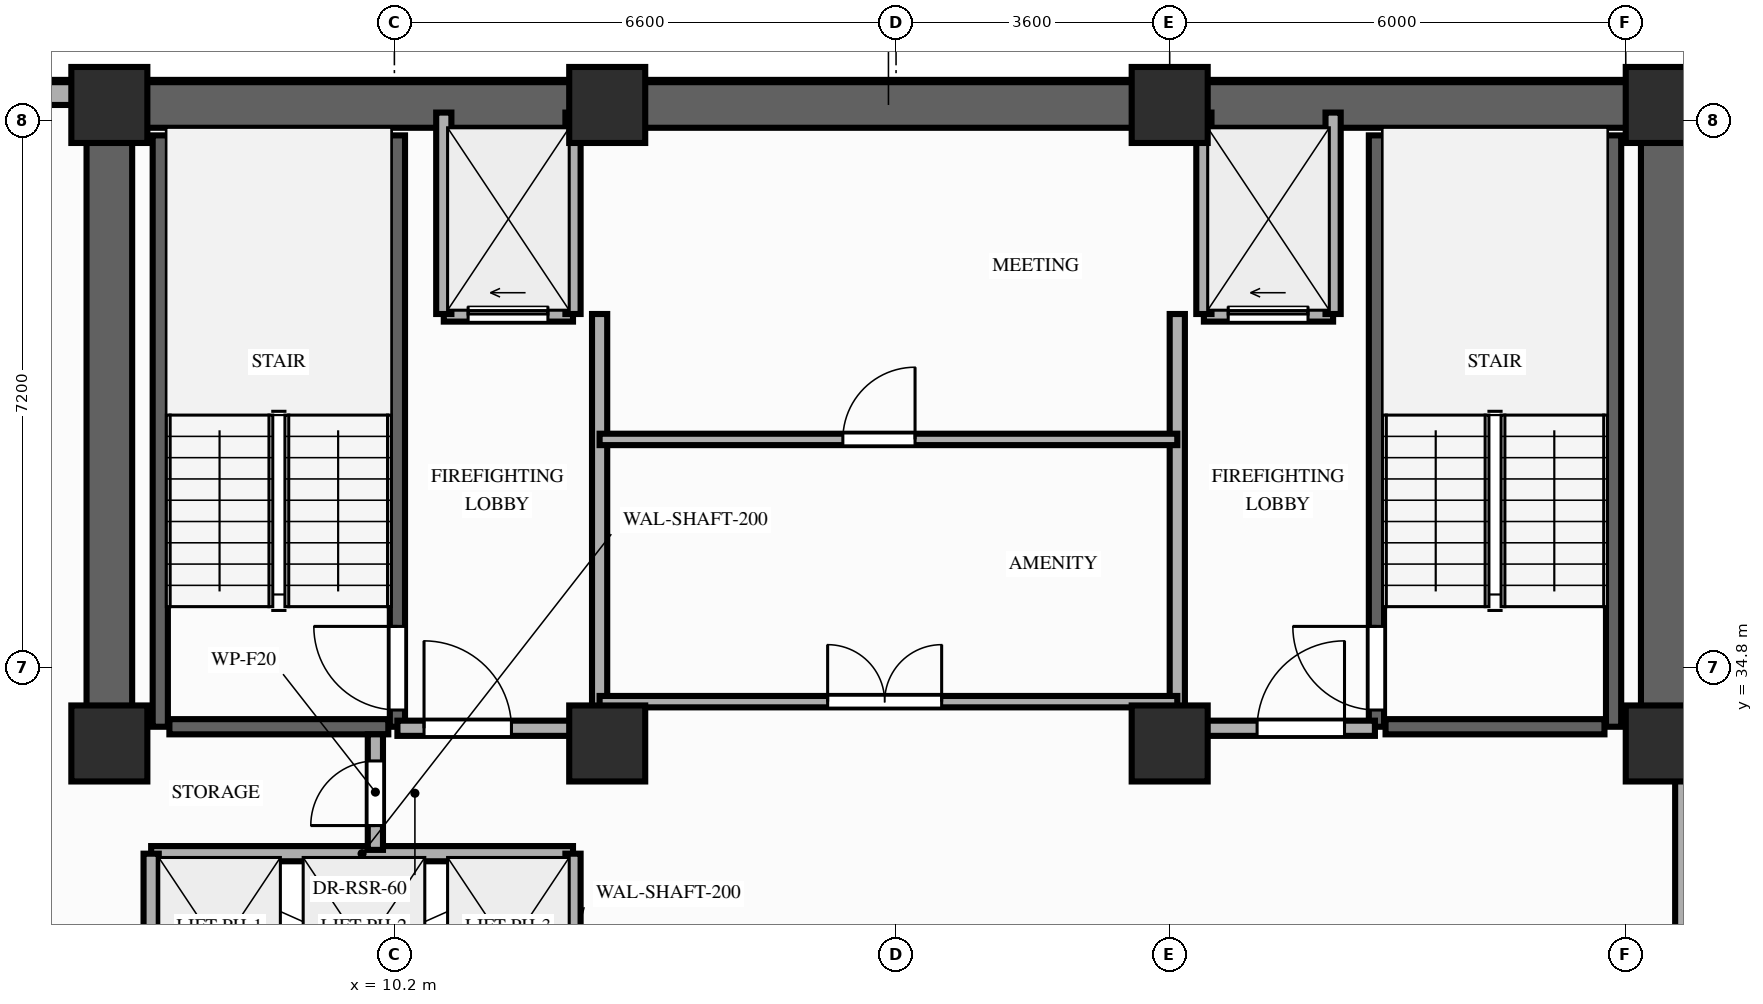
"""IFC4 building model, lengths in metres.
Left out: names, types, materials, properties, quantities, classifications, styles, units other than length and angle.
Written with IfcOpenShell. Run it as: python <this file> out.ifc"""

import sys

from ifc_helpers import new_model, si_unit, direction, frame, frame_2d, origin, origin_2d, place, context, subcontext, project, spatial, rectangle, extrude, element, fill, save


model = new_model("IFC4")
c1 = context("Model", 3, precision=1e-05, world=origin(), true_north=direction((0.0, 1.0)))
c2 = subcontext(c1, "Body", "Model", "MODEL_VIEW")
j1 = project(units=[si_unit("LENGTHUNIT", "METRE"), si_unit("PLANEANGLEUNIT", "RADIAN")], contexts=[c1])
p1 = place(None, origin())
s1 = spatial("IfcSite", under=j1, at=p1, CompositionType="ELEMENT")
p2 = place(p1, origin())
s2 = spatial("IfcBuilding", under=s1, at=p2, CompositionType="ELEMENT")
p3 = place(p2, frame((0.0, 0.0, 185.6)))
s3 = spatial("IfcBuildingStorey", under=s2, at=p3, CompositionType="ELEMENT", Elevation=185.6)
for number, where, z_axis, x_axis in (
    (1, (6.45, 33.8, 0.0), (0.0, 0.0, 1.0), (1.0, 0.0, 0.0)),
    (2, (13.0, 33.8, 0.0), (0.0, 0.0, 1.0), (1.0, 0.0, 0.0)),
    (3, (20.4, 33.8, 0.0), (0.0, 0.0, 1.0), (1.0, 0.0, 0.0)),
    (4, (26.9, 33.8, 0.0), (0.0, 0.0, 1.0), (1.0, 0.0, 0.0)),
    (5, (6.45, 42.2, 0.0), (0.0, 0.0, 1.0), (1.0, 0.0, 0.0)),
    (6, (13.0, 42.2, 0.0), (0.0, 0.0, 1.0), (1.0, 0.0, 0.0)),
    (7, (20.4, 42.2, 0.0), (0.0, 0.0, 1.0), (1.0, 0.0, 0.0)),
    (8, (26.9, 42.2, 0.0), (0.0, 0.0, 1.0), (1.0, 0.0, 0.0)),
):
    element("IfcColumn", number, at=place(p3, frame(where, z_axis=z_axis, x_axis=x_axis)), inside=s3, PredefinedType="COLUMN", context=c2, shape_type="SweptSolid", body=[
        extrude(rectangle(XDim=1.0, YDim=1.0, at=origin_2d()), origin(), (0.0, 0.0, 1.0), 3.2),
    ])
p4 = place(p3, frame((6.0, 42.35, 0.0), z_axis=(0.0, 0.0, 1.0), x_axis=(-1.0, 0.0, 0.0)))
e9 = element("IfcWall", 9, at=p4, inside=s3, PredefinedType="STANDARD", context=c2, shape_type="SweptSolid", body=[
    extrude(rectangle(XDim=2.0, YDim=0.3, at=frame_2d((1.0, 0.0))), origin(), (0.0, 0.0, 1.0), 3.02),
])
p5 = place(p3, frame((6.45, 42.2, 0.0), z_axis=(0.0, 0.0, 1.0), x_axis=(1.0, 0.0, 0.0)))
e10 = element("IfcWall", 10, at=p5, inside=s3, PredefinedType="SHEAR", context=c2, shape_type="SweptSolid", body=[
    extrude(rectangle(XDim=20.45, YDim=0.6, at=frame_2d((10.225, 0.0))), origin(), (0.0, 0.0, 1.0), 3.02),
])
for number, where, z_axis, x_axis in (
    (11, (6.45, 33.8, 0.0), (0.0, 0.0, 1.0), (0.0, 1.0, 0.0)),
    (12, (26.9, 33.8, 0.0), (0.0, 0.0, 1.0), (0.0, 1.0, 0.0)),
):
    element("IfcWall", number, at=place(p3, frame(where, z_axis=z_axis, x_axis=x_axis)), inside=s3, PredefinedType="SHEAR", context=c2, shape_type="SweptSolid", body=[
        extrude(rectangle(XDim=7.95, YDim=0.6, at=frame_2d((3.975, 0.0))), origin(), (0.0, 0.0, 1.0), 3.02),
    ])
p6 = place(p3, frame((7.12, 34.02, 0.0), z_axis=(0.0, 0.0, 1.0), x_axis=(0.0, 1.0, 0.0)))
e13 = element("IfcWall", 13, at=p6, inside=s3, PredefinedType="SHEAR", context=c2, shape_type="SweptSolid", body=[
    extrude(rectangle(XDim=7.78, YDim=0.2, at=frame_2d((3.89, 0.0))), origin(), (0.0, 0.0, 1.0), 3.02),
])
p7 = place(p3, frame((10.24, 34.02, 0.0), z_axis=(0.0, 0.0, 1.0), x_axis=(0.0, 1.0, 0.0)))
e14 = element("IfcWall", 14, at=p7, inside=s3, PredefinedType="SHEAR", context=c2, shape_type="SweptSolid", body=[
    extrude(rectangle(XDim=7.78, YDim=0.2, at=frame_2d((3.89, 0.0))), origin(), (0.0, 0.0, 1.0), 3.02),
])
p8 = place(p7, frame((0.22, 0.0, 0.0)))
e15 = element("IfcOpeningElement", 15, at=p8, cuts=e14, PredefinedType="OPENING", context=c2, shape_type="SweptSolid", body=[
    extrude(rectangle(XDim=1.1, YDim=2.15, at=frame_2d((0.55, 1.075))), frame((0.0, 0.11, 0.0), z_axis=(0.0, -1.0, 0.0), x_axis=(1.0, 0.0, 0.0)), (0.0, 0.0, 1.0), 0.22),
])
p9 = place(p3, frame((7.24, 34.02, 0.0), z_axis=(0.0, 0.0, 1.0), x_axis=(1.0, 0.0, 0.0)))
e16 = element("IfcWall", 16, at=p9, inside=s3, PredefinedType="SHEAR", context=c2, shape_type="SweptSolid", body=[
    extrude(rectangle(XDim=2.88, YDim=0.2, at=frame_2d((1.44, 0.0))), origin(), (0.0, 0.0, 1.0), 3.02),
])
p10 = place(p3, frame((23.12, 34.02, 0.0), z_axis=(0.0, 0.0, 1.0), x_axis=(0.0, 1.0, 0.0)))
e17 = element("IfcWall", 17, at=p10, inside=s3, PredefinedType="SHEAR", context=c2, shape_type="SweptSolid", body=[
    extrude(rectangle(XDim=7.78, YDim=0.2, at=frame_2d((3.89, 0.0))), origin(), (0.0, 0.0, 1.0), 3.02),
])
p11 = place(p10, frame((0.22, 0.0, 0.0)))
e18 = element("IfcOpeningElement", 18, at=p11, cuts=e17, PredefinedType="OPENING", context=c2, shape_type="SweptSolid", body=[
    extrude(rectangle(XDim=1.1, YDim=2.15, at=frame_2d((0.55, 1.075))), frame((0.0, 0.11, 0.0), z_axis=(0.0, -1.0, 0.0), x_axis=(1.0, 0.0, 0.0)), (0.0, 0.0, 1.0), 0.22),
])
p12 = place(p3, frame((26.24, 34.02, 0.0), z_axis=(0.0, 0.0, 1.0), x_axis=(0.0, 1.0, 0.0)))
e19 = element("IfcWall", 19, at=p12, inside=s3, PredefinedType="SHEAR", context=c2, shape_type="SweptSolid", body=[
    extrude(rectangle(XDim=7.78, YDim=0.2, at=frame_2d((3.89, 0.0))), origin(), (0.0, 0.0, 1.0), 3.02),
])
p13 = place(p3, frame((23.24, 34.02, 0.0), z_axis=(0.0, 0.0, 1.0), x_axis=(1.0, 0.0, 0.0)))
e20 = element("IfcWall", 20, at=p13, inside=s3, PredefinedType="SHEAR", context=c2, shape_type="SweptSolid", body=[
    extrude(rectangle(XDim=2.88, YDim=0.2, at=frame_2d((1.44, 0.0))), origin(), (0.0, 0.0, 1.0), 3.02),
])
p14 = place(p3, frame((7.0, 32.35, 0.0), z_axis=(0.0, 0.0, 1.0), x_axis=(1.0, 0.0, 0.0)))
e21 = element("IfcWall", 21, at=p14, inside=s3, PredefinedType="MOVABLE", context=c2, shape_type="SweptSolid", body=[
    extrude(rectangle(XDim=5.55, YDim=0.2, at=frame_2d((2.775, 0.0))), origin(), (0.0, 0.0, 1.0), 3.02),
])
for number, where, z_axis, x_axis in (
    (22, (7.0, 29.85, 0.0), (0.0, 0.0, 1.0), (0.0, 1.0, 0.0)),
    (23, (12.55, 29.85, 0.0), (0.0, 0.0, 1.0), (0.0, 1.0, 0.0)),
):
    element("IfcWall", number, at=place(p3, frame(where, z_axis=z_axis, x_axis=x_axis)), inside=s3, PredefinedType="MOVABLE", context=c2, shape_type="SweptSolid", body=[
        extrude(rectangle(XDim=2.5, YDim=0.2, at=frame_2d((1.25, 0.0))), origin(), (0.0, 0.0, 1.0), 3.02),
    ])
p15 = place(p3, frame((10.85, 39.45, 0.0), z_axis=(0.0, 0.0, 1.0), x_axis=(1.0, 0.0, 0.0)))
e24 = element("IfcWall", 24, at=p15, inside=s3, PredefinedType="MOVABLE", context=c2, shape_type="SweptSolid", body=[
    extrude(rectangle(XDim=1.7, YDim=0.2, at=frame_2d((0.85, 0.0))), origin(), (0.0, 0.0, 1.0), 3.02),
])
p16 = place(p15, frame((0.32, 0.0, 0.0)))
e25 = element("IfcOpeningElement", 25, at=p16, cuts=e24, PredefinedType="OPENING", context=c2, shape_type="SweptSolid", body=[
    extrude(rectangle(XDim=1.05, YDim=2.15, at=frame_2d((0.525, 1.075))), frame((0.0, 0.11, 0.0), z_axis=(0.0, -1.0, 0.0), x_axis=(1.0, 0.0, 0.0)), (0.0, 0.0, 1.0), 0.22),
])
p17 = place(p3, frame((20.85, 39.45, 0.0), z_axis=(0.0, 0.0, 1.0), x_axis=(1.0, 0.0, 0.0)))
e26 = element("IfcWall", 26, at=p17, inside=s3, PredefinedType="MOVABLE", context=c2, shape_type="SweptSolid", body=[
    extrude(rectangle(XDim=1.7, YDim=0.2, at=frame_2d((0.85, 0.0))), origin(), (0.0, 0.0, 1.0), 3.02),
])
p18 = place(p17, frame((0.32, 0.0, 0.0)))
e27 = element("IfcOpeningElement", 27, at=p18, cuts=e26, PredefinedType="OPENING", context=c2, shape_type="SweptSolid", body=[
    extrude(rectangle(XDim=1.05, YDim=2.15, at=frame_2d((0.525, 1.075))), frame((0.0, 0.11, 0.0), z_axis=(0.0, -1.0, 0.0), x_axis=(1.0, 0.0, 0.0)), (0.0, 0.0, 1.0), 0.22),
])
for number, where, z_axis, x_axis in (
    (28, (10.85, 39.45, 0.0), (0.0, 0.0, 1.0), (0.0, 1.0, 0.0)),
    (29, (12.55, 39.45, 0.0), (0.0, 0.0, 1.0), (0.0, 1.0, 0.0)),
):
    element("IfcWall", number, at=place(p3, frame(where, z_axis=z_axis, x_axis=x_axis)), inside=s3, PredefinedType="MOVABLE", context=c2, shape_type="SweptSolid", body=[
        extrude(rectangle(XDim=2.65, YDim=0.2, at=frame_2d((1.325, 0.0))), origin(), (0.0, 0.0, 1.0), 2.45),
    ])
p19 = place(p3, frame((12.9, 34.0, 0.0), z_axis=(0.0, 0.0, 1.0), x_axis=(0.0, 1.0, 0.0)))
e30 = element("IfcWall", 30, at=p19, inside=s3, PredefinedType="PARTITIONING", context=c2, shape_type="SweptSolid", body=[
    extrude(rectangle(XDim=5.45, YDim=0.2, at=frame_2d((2.725, 0.0))), origin(), (0.0, 0.0, 1.0), 2.45),
])
p20 = place(p3, frame((10.24, 34.0, 0.0), z_axis=(0.0, 0.0, 1.0), x_axis=(1.0, 0.0, 0.0)))
e31 = element("IfcWall", 31, at=p20, inside=s3, PredefinedType="PARTITIONING", context=c2, shape_type="SweptSolid", body=[
    extrude(rectangle(XDim=2.66, YDim=0.2, at=frame_2d((1.33, 0.0))), origin(), (0.0, 0.0, 1.0), 2.45),
])
p21 = place(p20, frame((0.35, 0.0, 0.0)))
e32 = element("IfcOpeningElement", 32, at=p21, cuts=e31, PredefinedType="OPENING", context=c2, shape_type="SweptSolid", body=[
    extrude(rectangle(XDim=1.15, YDim=2.15, at=frame_2d((0.575, 1.075))), frame((0.0, 0.11, 0.0), z_axis=(0.0, -1.0, 0.0), x_axis=(1.0, 0.0, 0.0)), (0.0, 0.0, 1.0), 0.22),
])
for number, where, z_axis, x_axis in (
    (33, (20.85, 39.45, 0.0), (0.0, 0.0, 1.0), (0.0, 1.0, 0.0)),
    (34, (22.55, 39.45, 0.0), (0.0, 0.0, 1.0), (0.0, 1.0, 0.0)),
):
    element("IfcWall", number, at=place(p3, frame(where, z_axis=z_axis, x_axis=x_axis)), inside=s3, PredefinedType="MOVABLE", context=c2, shape_type="SweptSolid", body=[
        extrude(rectangle(XDim=2.65, YDim=0.2, at=frame_2d((1.325, 0.0))), origin(), (0.0, 0.0, 1.0), 2.45),
    ])
p22 = place(p3, frame((20.5, 34.0, 0.0), z_axis=(0.0, 0.0, 1.0), x_axis=(0.0, 1.0, 0.0)))
e35 = element("IfcWall", 35, at=p22, inside=s3, PredefinedType="PARTITIONING", context=c2, shape_type="SweptSolid", body=[
    extrude(rectangle(XDim=5.45, YDim=0.2, at=frame_2d((2.725, 0.0))), origin(), (0.0, 0.0, 1.0), 2.45),
])
p23 = place(p3, frame((20.5, 34.0, 0.0), z_axis=(0.0, 0.0, 1.0), x_axis=(1.0, 0.0, 0.0)))
e36 = element("IfcWall", 36, at=p23, inside=s3, PredefinedType="PARTITIONING", context=c2, shape_type="SweptSolid", body=[
    extrude(rectangle(XDim=2.6, YDim=0.2, at=frame_2d((1.3, 0.0))), origin(), (0.0, 0.0, 1.0), 2.45),
])
p24 = place(p23, frame((1.05, 0.0, 0.0)))
e37 = element("IfcOpeningElement", 37, at=p24, cuts=e36, PredefinedType="OPENING", context=c2, shape_type="SweptSolid", body=[
    extrude(rectangle(XDim=1.15, YDim=2.15, at=frame_2d((0.575, 1.075))), frame((0.0, 0.11, 0.0), z_axis=(0.0, -1.0, 0.0), x_axis=(1.0, 0.0, 0.0)), (0.0, 0.0, 1.0), 0.22),
])
p25 = place(p3, frame((9.95, 32.4, 0.0), z_axis=(0.0, 0.0, 1.0), x_axis=(0.0, 1.0, 0.0)))
e38 = element("IfcWall", 38, at=p25, inside=s3, PredefinedType="PARTITIONING", context=c2, shape_type="SweptSolid", body=[
    extrude(rectangle(XDim=1.52, YDim=0.2, at=frame_2d((0.76, 0.0))), origin(), (0.0, 0.0, 1.0), 2.45),
])
p26 = place(p25, frame((0.32, 0.0, 0.0)))
e39 = element("IfcOpeningElement", 39, at=p26, cuts=e38, PredefinedType="OPENING", context=c2, shape_type="SweptSolid", body=[
    extrude(rectangle(XDim=0.85, YDim=2.05, at=frame_2d((0.425, 1.025))), frame((0.0, 0.11, 0.0), z_axis=(0.0, -1.0, 0.0), x_axis=(1.0, 0.0, 0.0)), (0.0, 0.0, 1.0), 0.22),
])
p27 = place(p3, frame((12.9, 34.35, 0.0), z_axis=(0.0, 0.0, 1.0), x_axis=(1.0, 0.0, 0.0)))
e40 = element("IfcWall", 40, at=p27, inside=s3, PredefinedType="PARTITIONING", context=c2, shape_type="SweptSolid", body=[
    extrude(rectangle(XDim=7.6, YDim=0.15, at=frame_2d((3.8, 0.0))), origin(), (0.0, 0.0, 1.0), 3.02),
])
p28 = place(p27, frame((3.0, 0.0, 0.0)))
e41 = element("IfcOpeningElement", 41, at=p28, cuts=e40, PredefinedType="OPENING", context=c2, shape_type="SweptSolid", body=[
    extrude(rectangle(XDim=1.5, YDim=2.15, at=frame_2d((0.75, 1.075))), frame((0.0, 0.085, 0.0), z_axis=(0.0, -1.0, 0.0), x_axis=(1.0, 0.0, 0.0)), (0.0, 0.0, 1.0), 0.17),
])
p29 = place(p3, frame((12.9, 37.8, 0.0), z_axis=(0.0, 0.0, 1.0), x_axis=(1.0, 0.0, 0.0)))
e42 = element("IfcWall", 42, at=p29, inside=s3, PredefinedType="PARTITIONING", context=c2, shape_type="SweptSolid", body=[
    extrude(rectangle(XDim=7.6, YDim=0.15, at=frame_2d((3.8, 0.0))), origin(), (0.0, 0.0, 1.0), 3.02),
])
p30 = place(p29, frame((3.2, 0.0, 0.0)))
e43 = element("IfcOpeningElement", 43, at=p30, cuts=e42, PredefinedType="OPENING", context=c2, shape_type="SweptSolid", body=[
    extrude(rectangle(XDim=0.95, YDim=2.15, at=frame_2d((0.475, 1.075))), frame((0.0, 0.085, 0.0), z_axis=(0.0, -1.0, 0.0), x_axis=(1.0, 0.0, 0.0)), (0.0, 0.0, 1.0), 0.17),
])
p31 = place(p3, frame((27.15, 31.2, 0.0), z_axis=(0.0, 0.0, 1.0), x_axis=(0.0, 1.0, 0.0)))
e44 = element("IfcWall", 44, at=p31, inside=s3, PredefinedType="PARTITIONING", context=c2, shape_type="SweptSolid", body=[
    extrude(rectangle(XDim=2.48, YDim=0.2, at=frame_2d((1.24, 0.0))), origin(), (0.0, 0.0, 1.0), 2.45),
])
p32 = place(p8, origin())
e45 = element("IfcDoor", 45, at=p32, inside=s3, OperationType="SINGLE_SWING_RIGHT", PredefinedType="DOOR", context=c2, shape_type="SweptSolid", body=[
    extrude(rectangle(XDim=1.1, YDim=2.15, at=frame_2d((0.55, 1.075))), frame((0.0, 0.025, 0.0), z_axis=(0.0, -1.0, 0.0), x_axis=(1.0, 0.0, 0.0)), (0.0, 0.0, 1.0), 0.05),
])
fill(e15, e45)
p33 = place(p11, origin())
e46 = element("IfcDoor", 46, at=p33, inside=s3, OperationType="SINGLE_SWING_RIGHT", PredefinedType="DOOR", context=c2, shape_type="SweptSolid", body=[
    extrude(rectangle(XDim=1.1, YDim=2.15, at=frame_2d((0.55, 1.075))), frame((0.0, 0.025, 0.0), z_axis=(0.0, -1.0, 0.0), x_axis=(1.0, 0.0, 0.0)), (0.0, 0.0, 1.0), 0.05),
])
fill(e18, e46)
p34 = place(p16, origin())
e47 = element("IfcDoor", 47, at=p34, inside=s3, OperationType="SLIDING_TO_LEFT", PredefinedType="DOOR", context=c2, shape_type="SweptSolid", body=[
    extrude(rectangle(XDim=1.05, YDim=2.15, at=frame_2d((0.525, 1.075))), frame((0.0, 0.025, 0.0), z_axis=(0.0, -1.0, 0.0), x_axis=(1.0, 0.0, 0.0)), (0.0, 0.0, 1.0), 0.05),
])
fill(e25, e47)
p35 = place(p18, origin())
e48 = element("IfcDoor", 48, at=p35, inside=s3, OperationType="SLIDING_TO_LEFT", PredefinedType="DOOR", context=c2, shape_type="SweptSolid", body=[
    extrude(rectangle(XDim=1.05, YDim=2.15, at=frame_2d((0.525, 1.075))), frame((0.0, 0.025, 0.0), z_axis=(0.0, -1.0, 0.0), x_axis=(1.0, 0.0, 0.0)), (0.0, 0.0, 1.0), 0.05),
])
fill(e27, e48)
p36 = place(p21, origin())
e49 = element("IfcDoor", 49, at=p36, inside=s3, OperationType="SINGLE_SWING_LEFT", PredefinedType="DOOR", context=c2, shape_type="SweptSolid", body=[
    extrude(rectangle(XDim=1.15, YDim=2.15, at=frame_2d((0.575, 1.075))), frame((0.0, 0.025, 0.0), z_axis=(0.0, -1.0, 0.0), x_axis=(1.0, 0.0, 0.0)), (0.0, 0.0, 1.0), 0.05),
])
fill(e32, e49)
p37 = place(p24, origin())
e50 = element("IfcDoor", 50, at=p37, inside=s3, OperationType="SINGLE_SWING_RIGHT", PredefinedType="DOOR", context=c2, shape_type="SweptSolid", body=[
    extrude(rectangle(XDim=1.15, YDim=2.15, at=frame_2d((0.575, 1.075))), frame((0.0, 0.025, 0.0), z_axis=(0.0, -1.0, 0.0), x_axis=(1.0, 0.0, 0.0)), (0.0, 0.0, 1.0), 0.05),
])
fill(e37, e50)
p38 = place(p26, origin())
e51 = element("IfcDoor", 51, at=p38, inside=s3, OperationType="SINGLE_SWING_LEFT", PredefinedType="DOOR", context=c2, shape_type="SweptSolid", body=[
    extrude(rectangle(XDim=0.85, YDim=2.05, at=frame_2d((0.425, 1.025))), frame((0.0, 0.025, 0.0), z_axis=(0.0, -1.0, 0.0), x_axis=(1.0, 0.0, 0.0)), (0.0, 0.0, 1.0), 0.05),
])
fill(e39, e51)
p39 = place(p28, origin())
e52 = element("IfcDoor", 52, at=p39, inside=s3, OperationType="DOUBLE_DOOR_SINGLE_SWING", PredefinedType="DOOR", context=c2, shape_type="SweptSolid", body=[
    extrude(rectangle(XDim=1.5, YDim=2.15, at=frame_2d((0.75, 1.075))), frame((0.0, 0.025, 0.0), z_axis=(0.0, -1.0, 0.0), x_axis=(1.0, 0.0, 0.0)), (0.0, 0.0, 1.0), 0.05),
])
fill(e41, e52)
p40 = place(p30, origin())
e53 = element("IfcDoor", 53, at=p40, inside=s3, OperationType="SINGLE_SWING_RIGHT", PredefinedType="DOOR", context=c2, shape_type="SweptSolid", body=[
    extrude(rectangle(XDim=0.95, YDim=2.15, at=frame_2d((0.475, 1.075))), frame((0.0, 0.025, 0.0), z_axis=(0.0, -1.0, 0.0), x_axis=(1.0, 0.0, 0.0)), (0.0, 0.0, 1.0), 0.05),
])
fill(e43, e53)
save(model, sys.argv[1])
